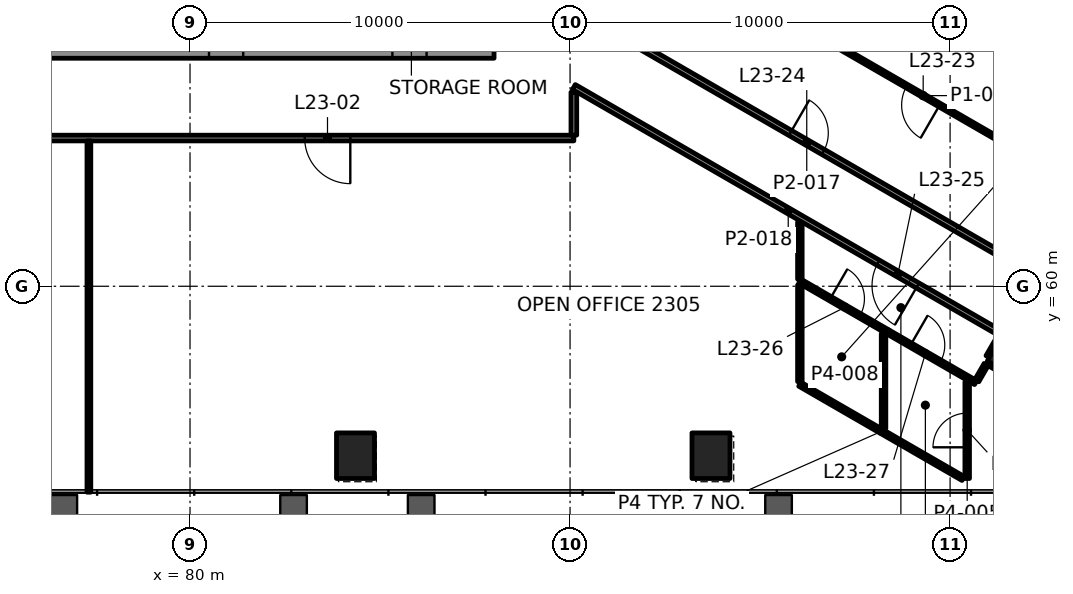
"""IFC4 building model, lengths in metres.
Left out: names, types, materials, properties, quantities, classifications, styles, units other than length and angle.
Written with IfcOpenShell. Run it as: python <this file> out.ifc"""

import sys

from ifc_helpers import new_model, si_unit, direction, frame, frame_2d, origin, origin_2d, place, context, subcontext, project, spatial, rectangle, extrude, element, fill, save


model = new_model("IFC4")
c1 = context("Model", 3, precision=1e-05, world=origin(), true_north=direction((0.0, 1.0)))
c2 = subcontext(c1, "Body", "Model", "MODEL_VIEW")
j1 = project(units=[si_unit("LENGTHUNIT", "METRE"), si_unit("PLANEANGLEUNIT", "RADIAN")], contexts=[c1])
p1 = place(None, origin())
s1 = spatial("IfcSite", under=j1, at=p1, CompositionType="ELEMENT")
p2 = place(p1, origin())
s2 = spatial("IfcBuilding", under=s1, at=p2, CompositionType="ELEMENT")
p3 = place(p2, frame((0.0, 0.0, 103.0)))
s3 = spatial("IfcBuildingStorey", under=s2, at=p3, CompositionType="ELEMENT", Elevation=103.0)
p4 = place(p3, frame((103.304, 58.659, 0.0), z_axis=(0.0, 0.0, 1.0), x_axis=(0.5, 0.866025403784, 0.0)))
e1 = element("IfcColumn", 1, at=p4, inside=s3, PredefinedType="COLUMN", context=c2, shape_type="SweptSolid", body=[
    extrude(rectangle(XDim=3.4, YDim=3.4, at=origin_2d()), origin(), (0.0, 0.0, 1.0), 4.2),
])
for number, where, z_axis, x_axis in (
    (2, (84.354, 55.541, -0.0), (0.0, 0.0, 1.0), (1.0, 0.0, 0.0)),
    (3, (93.708, 55.541, -0.0), (0.0, 0.0, 1.0), (1.0, 0.0, 0.0)),
):
    element("IfcColumn", number, at=place(p3, frame(where, z_axis=z_axis, x_axis=x_axis)), inside=s3, PredefinedType="COLUMN", context=c2, shape_type="SweptSolid", body=[
        extrude(rectangle(XDim=1.0, YDim=1.2, at=origin_2d()), origin(), (0.0, 0.0, 1.0), 4.2),
    ])
p5 = place(p3, frame((62.0, 66.45, 0.0), z_axis=(0.0, 0.0, 1.0), x_axis=(1.0, 0.0, 0.0)))
e4 = element("IfcWall", 4, at=p5, inside=s3, PredefinedType="SHEAR", context=c2, shape_type="SweptSolid", body=[
    extrude(rectangle(XDim=26.0, YDim=0.9, at=frame_2d((13.0, 0.0))), origin(), (0.0, 0.0, 1.0), 4.0),
])
p6 = place(p5, frame((3.45, 0.0, 0.0)))
e5 = element("IfcOpeningElement", 5, at=p6, cuts=e4, PredefinedType="OPENING", context=c2, shape_type="SweptSolid", body=[
    extrude(rectangle(XDim=0.9, YDim=2.1, at=frame_2d((0.45, 1.05))), frame((0.0, 0.46, 0.0), z_axis=(0.0, -1.0, 0.0), x_axis=(1.0, 0.0, 0.0)), (0.0, 0.0, 1.0), 0.92),
])
p7 = place(p5, frame((6.425, 0.0, 0.0)))
e6 = element("IfcOpeningElement", 6, at=p7, cuts=e4, PredefinedType="OPENING", context=c2, shape_type="SweptSolid", body=[
    extrude(rectangle(XDim=0.9, YDim=2.1, at=frame_2d((0.45, 1.05))), frame((0.0, 0.46, 0.0), z_axis=(0.0, -1.0, 0.0), x_axis=(1.0, 0.0, 0.0)), (0.0, 0.0, 1.0), 0.92),
])
p8 = place(p5, frame((11.5, 0.0, 0.0)))
e7 = element("IfcOpeningElement", 7, at=p8, cuts=e4, PredefinedType="OPENING", context=c2, shape_type="SweptSolid", body=[
    extrude(rectangle(XDim=0.9, YDim=2.1, at=frame_2d((0.45, 1.05))), frame((0.0, 0.46, 0.0), z_axis=(0.0, -1.0, 0.0), x_axis=(1.0, 0.0, 0.0)), (0.0, 0.0, 1.0), 0.92),
])
p9 = place(p5, frame((18.5, 0.0, 0.0)))
e8 = element("IfcOpeningElement", 8, at=p9, cuts=e4, PredefinedType="OPENING", context=c2, shape_type="SweptSolid", body=[
    extrude(rectangle(XDim=0.9, YDim=2.1, at=frame_2d((0.45, 1.05))), frame((0.0, 0.46, 0.0), z_axis=(0.0, -1.0, 0.0), x_axis=(1.0, 0.0, 0.0)), (0.0, 0.0, 1.0), 0.92),
])
p10 = place(p5, frame((23.325, 0.0, 0.0)))
e9 = element("IfcOpeningElement", 9, at=p10, cuts=e4, PredefinedType="OPENING", context=c2, shape_type="SweptSolid", body=[
    extrude(rectangle(XDim=0.9, YDim=2.1, at=frame_2d((0.45, 1.05))), frame((0.0, 0.46, 0.0), z_axis=(0.0, -1.0, 0.0), x_axis=(1.0, 0.0, 0.0)), (0.0, 0.0, 1.0), 0.92),
])
p11 = place(p3, frame((90.099, 63.9, 0.0), z_axis=(0.0, 0.0, 1.0), x_axis=(-1.0, 0.0, 0.0)))
e10 = element("IfcWall", 10, at=p11, inside=s3, PredefinedType="PARTITIONING", context=c2, shape_type="SweptSolid", body=[
    extrude(rectangle(XDim=30.199, YDim=0.15, at=frame_2d((15.099, 0.0))), origin(), (0.0, 0.0, 1.0), 3.4),
])
p12 = place(p11, frame((5.882, 0.0, 0.0)))
e11 = element("IfcOpeningElement", 11, at=p12, cuts=e10, PredefinedType="OPENING", context=c2, shape_type="SweptSolid", body=[
    extrude(rectangle(XDim=1.2, YDim=2.1, at=frame_2d((0.6, 1.05))), frame((0.0, 0.085, 0.0), z_axis=(0.0, -1.0, 0.0), x_axis=(1.0, 0.0, 0.0)), (0.0, 0.0, 1.0), 0.17),
])
p13 = place(p11, frame((20.346, 0.0, 0.0)))
e12 = element("IfcOpeningElement", 12, at=p13, cuts=e10, PredefinedType="OPENING", context=c2, shape_type="SweptSolid", body=[
    extrude(rectangle(XDim=1.2, YDim=2.1, at=frame_2d((0.6, 1.05))), frame((0.0, 0.085, 0.0), z_axis=(0.0, -1.0, 0.0), x_axis=(1.0, 0.0, 0.0)), (0.0, 0.0, 1.0), 0.17),
])
p14 = place(p3, frame((100.704, 57.516, 0.0), z_axis=(0.0, 0.0, 1.0), x_axis=(0.499679281737, 0.866210491395, 0.0)))
e13 = element("IfcWall", 13, at=p14, inside=s3, PredefinedType="PARTITIONING", context=c2, shape_type="SweptSolid", body=[
    extrude(rectangle(XDim=0.49, YDim=0.12, at=frame_2d((0.245, 0.0))), origin(), (0.0, 0.0, 1.0), 3.4),
])
p15 = place(p3, frame((101.031, 58.124, 0.0), z_axis=(0.0, 0.0, 1.0), x_axis=(0.500049599607, 0.865996765544, 0.0)))
e14 = element("IfcWall", 14, at=p15, inside=s3, PredefinedType="PARTITIONING", context=c2, shape_type="SweptSolid", body=[
    extrude(rectangle(XDim=0.625, YDim=0.2, at=frame_2d((0.312, 0.0))), origin(), (0.0, 0.0, 1.0), 3.4),
])
p16 = place(p3, frame((100.45, 54.941, 0.0), z_axis=(0.0, 0.0, 1.0), x_axis=(0.0, 1.0, 0.0)))
e15 = element("IfcWall", 15, at=p16, inside=s3, PredefinedType="PARTITIONING", context=c2, shape_type="SweptSolid", body=[
    extrude(rectangle(XDim=2.542, YDim=0.12, at=frame_2d((1.271, 0.0))), origin(), (0.0, 0.0, 1.0), 3.4),
])
p17 = place(p16, frame((0.821, 0.0, 0.0)))
e16 = element("IfcOpeningElement", 16, at=p17, cuts=e15, PredefinedType="OPENING", context=c2, shape_type="SweptSolid", body=[
    extrude(rectangle(XDim=0.9, YDim=2.1, at=frame_2d((0.45, 1.05))), frame((0.0, 0.07, 0.0), z_axis=(0.0, -1.0, 0.0), x_axis=(1.0, 0.0, 0.0)), (0.0, 0.0, 1.0), 0.14),
])
p18 = place(p3, frame((98.249, 56.26, 0.0), z_axis=(0.0, 0.0, 1.0), x_axis=(0.0, 1.0, 0.0)))
e17 = element("IfcWall", 17, at=p18, inside=s3, PredefinedType="PARTITIONING", context=c2, shape_type="SweptSolid", body=[
    extrude(rectangle(XDim=2.495, YDim=0.12, at=frame_2d((1.248, 0.0))), origin(), (0.0, 0.0, 1.0), 3.4),
])
p19 = place(p3, frame((96.047, 57.491, 0.0), z_axis=(0.0, 0.0, 1.0), x_axis=(0.0, 1.0, 0.0)))
e18 = element("IfcWall", 18, at=p19, inside=s3, PredefinedType="PARTITIONING", context=c2, shape_type="SweptSolid", body=[
    extrude(rectangle(XDim=2.541, YDim=0.12, at=frame_2d((1.27, 0.0))), origin(), (0.0, 0.0, 1.0), 3.4),
])
p20 = place(p3, frame((90.1, 63.976, 0.0), z_axis=(0.0, 0.0, 1.0), x_axis=(0.0, 1.0, 0.0)))
e19 = element("IfcWall", 19, at=p20, inside=s3, PredefinedType="PARTITIONING", context=c2, shape_type="SweptSolid", body=[
    extrude(rectangle(XDim=1.131, YDim=0.15, at=frame_2d((0.565, 0.0))), origin(), (0.0, 0.0, 1.0), 3.247),
])
p21 = place(p3, frame((77.339, 54.581, 0.0), z_axis=(0.0, 0.0, 1.0), x_axis=(0.0, 1.0, 0.0)))
e20 = element("IfcWall", 20, at=p21, inside=s3, PredefinedType="PARTITIONING", context=c2, shape_type="SweptSolid", body=[
    extrude(rectangle(XDim=9.244, YDim=0.1, at=frame_2d((4.622, 0.0))), origin(), (0.0, 0.0, 1.0), 3.165),
])
p22 = place(p3, frame((105.833, 61.24, 0.0), z_axis=(0.0, 0.0, 1.0), x_axis=(-0.866025727262, 0.499999439721, 0.0)))
e21 = element("IfcWall", 21, at=p22, inside=s3, PredefinedType="PARTITIONING", context=c2, shape_type="SweptSolid", body=[
    extrude(rectangle(XDim=15.107, YDim=0.1, at=frame_2d((7.553, 0.0))), origin(), (0.0, 0.0, 1.0), 3.4),
])
p23 = place(p22, frame((7.053, 0.0, 0.0)))
e22 = element("IfcOpeningElement", 22, at=p23, cuts=e21, PredefinedType="OPENING", context=c2, shape_type="SweptSolid", body=[
    extrude(rectangle(XDim=1.0, YDim=2.1, at=frame_2d((0.5, 1.05))), frame((0.0, 0.06, 0.0), z_axis=(0.0, -1.0, 0.0), x_axis=(1.0, 0.0, 0.0)), (0.0, 0.0, 1.0), 0.12),
])
p24 = place(p3, frame((90.175, 67.278, 0.0), z_axis=(0.0, 0.0, 1.0), x_axis=(0.866025916507, -0.499999111938, 0.0)))
e23 = element("IfcWall", 23, at=p24, inside=s3, PredefinedType="PARTITIONING", context=c2, shape_type="SweptSolid", body=[
    extrude(rectangle(XDim=13.979, YDim=0.15, at=frame_2d((6.99, 0.0))), origin(), (0.0, 0.0, 1.0), 3.4),
])
p25 = place(p24, frame((6.49, 0.0, 0.0)))
e24 = element("IfcOpeningElement", 24, at=p25, cuts=e23, PredefinedType="OPENING", context=c2, shape_type="SweptSolid", body=[
    extrude(rectangle(XDim=1.0, YDim=2.1, at=frame_2d((0.5, 1.05))), frame((0.0, 0.085, 0.0), z_axis=(0.0, -1.0, 0.0), x_axis=(1.0, 0.0, 0.0)), (0.0, 0.0, 1.0), 0.17),
])
p26 = place(p3, frame((101.382, 58.729, 0.0), z_axis=(0.0, 0.0, 1.0), x_axis=(-0.866023606965, 0.500003112169, 0.0)))
e25 = element("IfcWall", 25, at=p26, inside=s3, PredefinedType="PARTITIONING", context=c2, shape_type="SweptSolid", body=[
    extrude(rectangle(XDim=13.027, YDim=0.15, at=frame_2d((6.513, 0.0))), origin(), (0.0, 0.0, 1.0), 3.247),
])
p27 = place(p26, frame((2.581, 0.0, 0.0)))
e26 = element("IfcOpeningElement", 26, at=p27, cuts=e25, PredefinedType="OPENING", context=c2, shape_type="SweptSolid", body=[
    extrude(rectangle(XDim=1.2, YDim=2.1, at=frame_2d((0.6, 1.05))), frame((0.0, 0.085, 0.0), z_axis=(0.0, -1.0, 0.0), x_axis=(1.0, 0.0, 0.0)), (0.0, 0.0, 1.0), 0.17),
])
p28 = place(p3, frame((104.065, 56.257, 0.0), z_axis=(0.0, 0.0, 1.0), x_axis=(-0.866034141321, 0.499984865837, 0.0)))
e27 = element("IfcWall", 27, at=p28, inside=s3, PredefinedType="PARTITIONING", context=c2, shape_type="SweptSolid", body=[
    extrude(rectangle(XDim=3.543, YDim=0.2, at=frame_2d((1.772, 0.0))), origin(), (0.0, 0.0, 1.0), 3.4),
])
p29 = place(p3, frame((96.047, 60.135, 0.0), z_axis=(0.0, 0.0, 1.0), x_axis=(0.866018138487, -0.500012583653, 0.0)))
e28 = element("IfcWall", 28, at=p29, inside=s3, PredefinedType="PARTITIONING", context=c2, shape_type="SweptSolid", body=[
    extrude(rectangle(XDim=5.342, YDim=0.12, at=frame_2d((2.671, 0.0))), origin(), (0.0, 0.0, 1.0), 3.4),
])
p30 = place(p29, frame((0.923, 0.0, 0.0)))
e29 = element("IfcOpeningElement", 29, at=p30, cuts=e28, PredefinedType="OPENING", context=c2, shape_type="SweptSolid", body=[
    extrude(rectangle(XDim=0.9, YDim=2.1, at=frame_2d((0.45, 1.05))), frame((0.0, 0.07, 0.0), z_axis=(0.0, -1.0, 0.0), x_axis=(1.0, 0.0, 0.0)), (0.0, 0.0, 1.0), 0.14),
])
p31 = place(p29, frame((3.364, 0.0, 0.0)))
e30 = element("IfcOpeningElement", 30, at=p31, cuts=e28, PredefinedType="OPENING", context=c2, shape_type="SweptSolid", body=[
    extrude(rectangle(XDim=0.9, YDim=2.1, at=frame_2d((0.45, 1.05))), frame((0.0, 0.07, 0.0), z_axis=(0.0, -1.0, 0.0), x_axis=(1.0, 0.0, 0.0)), (0.0, 0.0, 1.0), 0.14),
])
p32 = place(p3, frame((100.343, 54.941, 0.0), z_axis=(0.0, 0.0, 1.0), x_axis=(-0.866005271205, 0.500034869029, 0.0)))
e31 = element("IfcWall", 31, at=p32, inside=s3, PredefinedType="PARTITIONING", context=c2, shape_type="SweptSolid", body=[
    extrude(rectangle(XDim=4.961, YDim=0.12, at=frame_2d((2.48, 0.0))), origin(), (0.0, 0.0, 1.0), 3.4),
])
p33 = place(p3, frame((96.047, 60.187, 0.0), z_axis=(0.0, 0.0, 1.0), x_axis=(0.0, 1.0, 0.0)))
e32 = element("IfcWall", 32, at=p33, inside=s3, PredefinedType="PARTITIONING", context=c2, shape_type="SweptSolid", body=[
    extrude(rectangle(XDim=1.496, YDim=0.12, at=frame_2d((0.748, 0.0))), origin(), (0.0, 0.0, 1.0), 3.4),
])
p34 = place(p12, origin())
e33 = element("IfcDoor", 33, at=p34, inside=s3, OperationType="DOUBLE_DOOR_SINGLE_SWING", PredefinedType="DOOR", context=c2, shape_type="SweptSolid", body=[
    extrude(rectangle(XDim=1.2, YDim=2.1, at=frame_2d((0.6, 1.05))), frame((0.0, 0.025, 0.0), z_axis=(0.0, -1.0, 0.0), x_axis=(1.0, 0.0, 0.0)), (0.0, 0.0, 1.0), 0.05),
])
fill(e11, e33)
p35 = place(p17, origin())
e34 = element("IfcDoor", 34, at=p35, inside=s3, OperationType="SINGLE_SWING_RIGHT", PredefinedType="DOOR", context=c2, shape_type="SweptSolid", body=[
    extrude(rectangle(XDim=0.9, YDim=2.1, at=frame_2d((0.45, 1.05))), frame((0.0, 0.025, 0.0), z_axis=(0.0, -1.0, 0.0), x_axis=(1.0, 0.0, 0.0)), (0.0, 0.0, 1.0), 0.05),
])
fill(e16, e34)
p36 = place(p23, origin())
e35 = element("IfcDoor", 35, at=p36, inside=s3, OperationType="SINGLE_SWING_LEFT", PredefinedType="DOOR", context=c2, shape_type="SweptSolid", body=[
    extrude(rectangle(XDim=1.0, YDim=2.1, at=frame_2d((0.5, 1.05))), frame((0.0, 0.025, 0.0), z_axis=(0.0, -1.0, 0.0), x_axis=(1.0, 0.0, 0.0)), (0.0, 0.0, 1.0), 0.05),
])
fill(e22, e35)
p37 = place(p25, origin())
e36 = element("IfcDoor", 36, at=p37, inside=s3, OperationType="SINGLE_SWING_LEFT", PredefinedType="DOOR", context=c2, shape_type="SweptSolid", body=[
    extrude(rectangle(XDim=1.0, YDim=2.1, at=frame_2d((0.5, 1.05))), frame((0.0, 0.025, 0.0), z_axis=(0.0, -1.0, 0.0), x_axis=(1.0, 0.0, 0.0)), (0.0, 0.0, 1.0), 0.05),
])
fill(e24, e36)
p38 = place(p27, origin())
e37 = element("IfcDoor", 37, at=p38, inside=s3, OperationType="DOUBLE_DOOR_SINGLE_SWING", PredefinedType="DOOR", context=c2, shape_type="SweptSolid", body=[
    extrude(rectangle(XDim=1.2, YDim=2.1, at=frame_2d((0.6, 1.05))), frame((0.0, 0.025, 0.0), z_axis=(0.0, -1.0, 0.0), x_axis=(1.0, 0.0, 0.0)), (0.0, 0.0, 1.0), 0.05),
])
fill(e26, e37)
p39 = place(p30, origin())
e38 = element("IfcDoor", 38, at=p39, inside=s3, OperationType="SINGLE_SWING_LEFT", PredefinedType="DOOR", context=c2, shape_type="SweptSolid", body=[
    extrude(rectangle(XDim=0.9, YDim=2.1, at=frame_2d((0.45, 1.05))), frame((0.0, 0.025, 0.0), z_axis=(0.0, -1.0, 0.0), x_axis=(1.0, 0.0, 0.0)), (0.0, 0.0, 1.0), 0.05),
])
fill(e29, e38)
p40 = place(p31, origin())
e39 = element("IfcDoor", 39, at=p40, inside=s3, OperationType="SINGLE_SWING_RIGHT", PredefinedType="DOOR", context=c2, shape_type="SweptSolid", body=[
    extrude(rectangle(XDim=0.9, YDim=2.1, at=frame_2d((0.45, 1.05))), frame((0.0, 0.025, 0.0), z_axis=(0.0, -1.0, 0.0), x_axis=(1.0, 0.0, 0.0)), (0.0, 0.0, 1.0), 0.05),
])
fill(e30, e39)
save(model, sys.argv[1])
